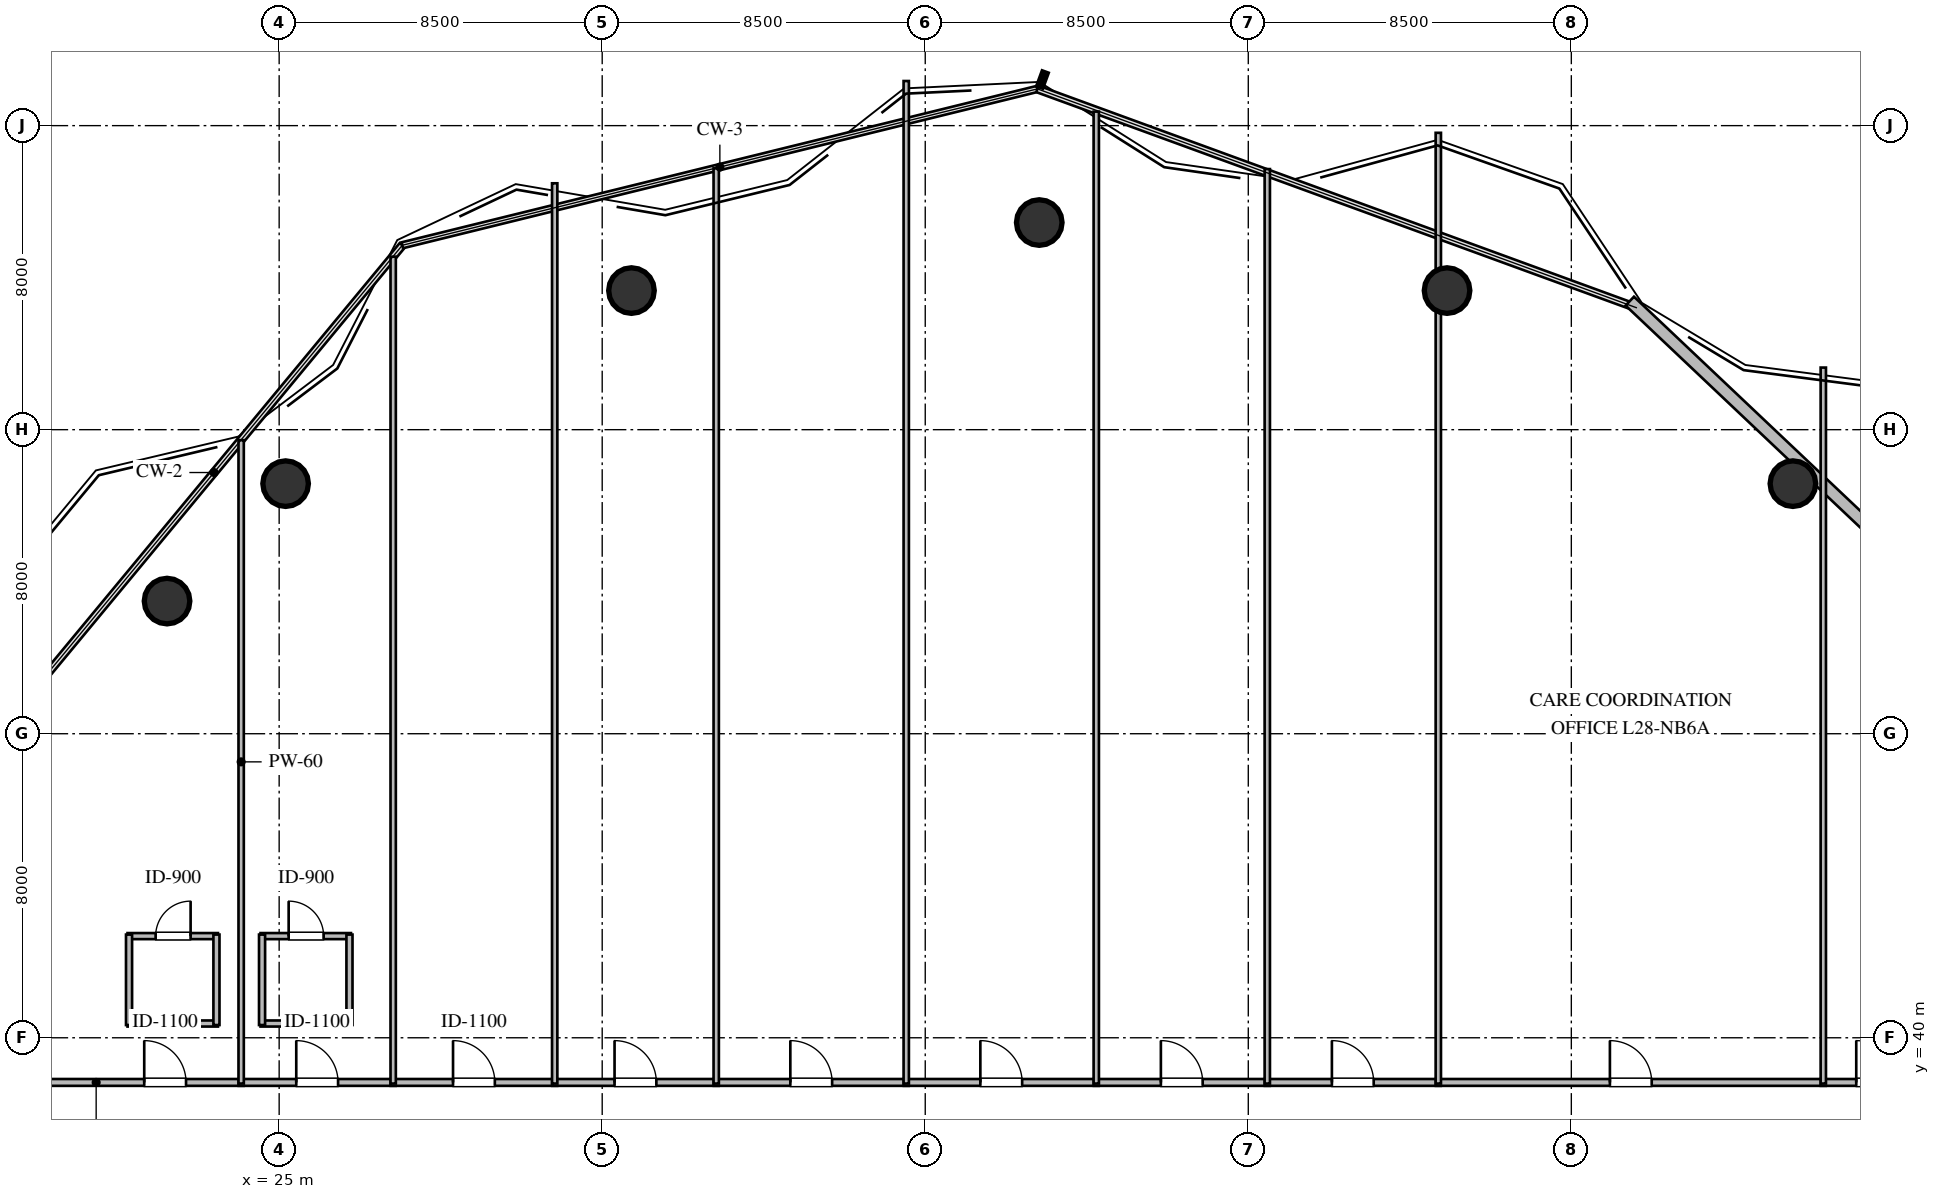
"""IFC4 building model, lengths in metres.
Left out: names, types, materials, properties, quantities, classifications, styles, units other than length and angle.
Written with IfcOpenShell. Run it as: python <this file> out.ifc"""

import sys

from ifc_helpers import new_model, si_unit, direction, frame, frame_2d, origin, origin_2d, place, context, subcontext, project, spatial, rectangle, circle, extrude, element, fill, save


model = new_model("IFC4")
c1 = context("Model", 3, precision=1e-05, world=origin(), true_north=direction((0.0, 1.0)))
c2 = subcontext(c1, "Body", "Model", "MODEL_VIEW")
j1 = project(units=[si_unit("LENGTHUNIT", "METRE"), si_unit("PLANEANGLEUNIT", "RADIAN")], contexts=[c1])
p1 = place(None, origin())
s1 = spatial("IfcSite", under=j1, at=p1, CompositionType="ELEMENT")
p2 = place(p1, origin())
s2 = spatial("IfcBuilding", under=s1, at=p2, CompositionType="ELEMENT")
p3 = place(p2, frame((0.0, 0.0, 109.8)))
s3 = spatial("IfcBuildingStorey", under=s2, at=p3, CompositionType="ELEMENT", Elevation=109.8)
for number, where, z_axis, x_axis in (
    (1, (64.83, 54.58, 0.0), (0.0, 0.0, 1.0), (1.0, 0.0, 0.0)),
    (2, (55.73, 59.66, 0.0), (0.0, 0.0, 1.0), (1.0, 0.0, 0.0)),
    (3, (45.0, 61.45, 0.0), (0.0, 0.0, 1.0), (1.0, 0.0, 0.0)),
    (4, (34.27, 59.66, 0.0), (0.0, 0.0, 1.0), (1.0, 0.0, 0.0)),
    (5, (25.17, 54.58, 0.0), (0.0, 0.0, 1.0), (1.0, 0.0, 0.0)),
    (6, (22.05, 51.49, 0.0), (0.0, 0.0, 1.0), (1.0, 0.0, 0.0)),
):
    element("IfcColumn", number, at=place(p3, frame(where, z_axis=z_axis, x_axis=x_axis)), inside=s3, PredefinedType="COLUMN", context=c2, shape_type="SweptSolid", body=[
        extrude(circle(Radius=0.6, at=origin_2d()), origin(), (0.0, 0.0, 1.0), 3.6),
    ])
p4 = place(p3, frame((60.538, 59.383, 0.0), z_axis=(0.0, 0.0, 1.0), x_axis=(0.726378346584, -0.687295058628, 0.0)))
e7 = element("IfcWall", 7, at=p4, inside=s3, PredefinedType="STANDARD", context=c2, shape_type="SweptSolid", body=[
    extrude(rectangle(XDim=15.654, YDim=0.32, at=frame_2d((7.827, 0.0))), origin(), (0.0, 0.0, 1.0), 3.36),
])
p5 = place(p3, frame((21.01, 40.375, 0.0), z_axis=(0.0, 0.0, 1.0), x_axis=(1.0, 0.0, 0.0)))
e8 = element("IfcWall", 8, at=p5, inside=s3, PredefinedType="PLUMBINGWALL", context=c2, shape_type="SweptSolid", body=[
    extrude(rectangle(XDim=2.38, YDim=0.16, at=frame_2d((1.19, 0.0))), origin(), (0.0, 0.0, 1.0), 3.36),
])
p6 = place(p3, frame((21.01, 42.675, 0.0), z_axis=(0.0, 0.0, 1.0), x_axis=(1.0, 0.0, 0.0)))
e9 = element("IfcWall", 9, at=p6, inside=s3, PredefinedType="PLUMBINGWALL", context=c2, shape_type="SweptSolid", body=[
    extrude(rectangle(XDim=2.38, YDim=0.16, at=frame_2d((1.19, 0.0))), origin(), (0.0, 0.0, 1.0), 3.36),
])
p7 = place(p6, frame((0.74, 0.0, 0.0)))
e10 = element("IfcOpeningElement", 10, at=p7, cuts=e9, PredefinedType="OPENING", context=c2, shape_type="SweptSolid", body=[
    extrude(rectangle(XDim=0.92, YDim=2.1, at=frame_2d((0.46, 1.05))), frame((0.0, 0.09, 0.0), z_axis=(0.0, -1.0, 0.0), x_axis=(1.0, 0.0, 0.0)), (0.0, 0.0, 1.0), 0.18),
])
p8 = place(p3, frame((21.05, 40.335, 0.0), z_axis=(0.0, 0.0, 1.0), x_axis=(0.0, 1.0, 0.0)))
e11 = element("IfcWall", 11, at=p8, inside=s3, PredefinedType="PLUMBINGWALL", context=c2, shape_type="SweptSolid", body=[
    extrude(rectangle(XDim=2.38, YDim=0.16, at=frame_2d((1.19, 0.0))), origin(), (0.0, 0.0, 1.0), 3.36),
])
p9 = place(p3, frame((23.35, 40.335, 0.0), z_axis=(0.0, 0.0, 1.0), x_axis=(0.0, 1.0, 0.0)))
e12 = element("IfcWall", 12, at=p9, inside=s3, PredefinedType="PLUMBINGWALL", context=c2, shape_type="SweptSolid", body=[
    extrude(rectangle(XDim=2.38, YDim=0.16, at=frame_2d((1.19, 0.0))), origin(), (0.0, 0.0, 1.0), 2.806),
])
p10 = place(p3, frame((24.51, 40.375, 0.0), z_axis=(0.0, 0.0, 1.0), x_axis=(1.0, 0.0, 0.0)))
e13 = element("IfcWall", 13, at=p10, inside=s3, PredefinedType="PLUMBINGWALL", context=c2, shape_type="SweptSolid", body=[
    extrude(rectangle(XDim=2.38, YDim=0.16, at=frame_2d((1.19, 0.0))), origin(), (0.0, 0.0, 1.0), 3.36),
])
p11 = place(p3, frame((24.51, 42.675, 0.0), z_axis=(0.0, 0.0, 1.0), x_axis=(1.0, 0.0, 0.0)))
e14 = element("IfcWall", 14, at=p11, inside=s3, PredefinedType="PLUMBINGWALL", context=c2, shape_type="SweptSolid", body=[
    extrude(rectangle(XDim=2.38, YDim=0.16, at=frame_2d((1.19, 0.0))), origin(), (0.0, 0.0, 1.0), 3.36),
])
p12 = place(p11, frame((0.74, 0.0, 0.0)))
e15 = element("IfcOpeningElement", 15, at=p12, cuts=e14, PredefinedType="OPENING", context=c2, shape_type="SweptSolid", body=[
    extrude(rectangle(XDim=0.92, YDim=2.1, at=frame_2d((0.46, 1.05))), frame((0.0, 0.09, 0.0), z_axis=(0.0, -1.0, 0.0), x_axis=(1.0, 0.0, 0.0)), (0.0, 0.0, 1.0), 0.18),
])
for number, where, z_axis, x_axis in (
    (16, (24.55, 40.335, 0.0), (0.0, 0.0, 1.0), (0.0, 1.0, 0.0)),
    (17, (26.85, 40.335, 0.0), (0.0, 0.0, 1.0), (0.0, 1.0, 0.0)),
):
    element("IfcWall", number, at=place(p3, frame(where, z_axis=z_axis, x_axis=x_axis)), inside=s3, PredefinedType="PLUMBINGWALL", context=c2, shape_type="SweptSolid", body=[
        extrude(rectangle(XDim=2.38, YDim=0.16, at=frame_2d((1.19, 0.0))), origin(), (0.0, 0.0, 1.0), 3.36),
    ])
p13 = place(p3, frame((16.305, 38.825, 0.0), z_axis=(0.0, 0.0, 1.0), x_axis=(1.0, 0.0, 0.0)))
e18 = element("IfcWall", 18, at=p13, inside=s3, PredefinedType="PARTITIONING", context=c2, shape_type="SweptSolid", body=[
    extrude(rectangle(XDim=7.76, YDim=0.18, at=frame_2d((3.88, 0.0))), origin(), (0.0, 0.0, 1.0), 3.36),
])
p14 = place(p13, frame((5.145, 0.0, 0.0)))
e19 = element("IfcOpeningElement", 19, at=p14, cuts=e18, PredefinedType="OPENING", context=c2, shape_type="SweptSolid", body=[
    extrude(rectangle(XDim=1.1, YDim=2.1, at=frame_2d((0.55, 1.05))), frame((0.0, 0.1, 0.0), z_axis=(0.0, -1.0, 0.0), x_axis=(1.0, 0.0, 0.0)), (0.0, 0.0, 1.0), 0.2),
])
p15 = place(p3, frame((23.935, 38.825, 0.0), z_axis=(0.0, 0.0, 1.0), x_axis=(1.0, 0.0, 0.0)))
e20 = element("IfcWall", 20, at=p15, inside=s3, PredefinedType="PARTITIONING", context=c2, shape_type="SweptSolid", body=[
    extrude(rectangle(XDim=4.13, YDim=0.18, at=frame_2d((2.065, 0.0))), origin(), (0.0, 0.0, 1.0), 3.36),
])
p16 = place(p15, frame((1.515, 0.0, 0.0)))
e21 = element("IfcOpeningElement", 21, at=p16, cuts=e20, PredefinedType="OPENING", context=c2, shape_type="SweptSolid", body=[
    extrude(rectangle(XDim=1.1, YDim=2.1, at=frame_2d((0.55, 1.05))), frame((0.0, 0.1, 0.0), z_axis=(0.0, -1.0, 0.0), x_axis=(1.0, 0.0, 0.0)), (0.0, 0.0, 1.0), 0.2),
])
p17 = place(p3, frame((27.935, 38.825, 0.0), z_axis=(0.0, 0.0, 1.0), x_axis=(1.0, 0.0, 0.0)))
e22 = element("IfcWall", 22, at=p17, inside=s3, PredefinedType="PARTITIONING", context=c2, shape_type="SweptSolid", body=[
    extrude(rectangle(XDim=4.38, YDim=0.18, at=frame_2d((2.19, 0.0))), origin(), (0.0, 0.0, 1.0), 3.36),
])
p18 = place(p17, frame((1.64, 0.0, 0.0)))
e23 = element("IfcOpeningElement", 23, at=p18, cuts=e22, PredefinedType="OPENING", context=c2, shape_type="SweptSolid", body=[
    extrude(rectangle(XDim=1.1, YDim=2.1, at=frame_2d((0.55, 1.05))), frame((0.0, 0.1, 0.0), z_axis=(0.0, -1.0, 0.0), x_axis=(1.0, 0.0, 0.0)), (0.0, 0.0, 1.0), 0.2),
])
p19 = place(p3, frame((32.185, 38.825, 0.0), z_axis=(0.0, 0.0, 1.0), x_axis=(1.0, 0.0, 0.0)))
e24 = element("IfcWall", 24, at=p19, inside=s3, PredefinedType="PARTITIONING", context=c2, shape_type="SweptSolid", body=[
    extrude(rectangle(XDim=4.38, YDim=0.18, at=frame_2d((2.19, 0.0))), origin(), (0.0, 0.0, 1.0), 3.36),
])
p20 = place(p19, frame((1.64, 0.0, 0.0)))
e25 = element("IfcOpeningElement", 25, at=p20, cuts=e24, PredefinedType="OPENING", context=c2, shape_type="SweptSolid", body=[
    extrude(rectangle(XDim=1.1, YDim=2.1, at=frame_2d((0.55, 1.05))), frame((0.0, 0.1, 0.0), z_axis=(0.0, -1.0, 0.0), x_axis=(1.0, 0.0, 0.0)), (0.0, 0.0, 1.0), 0.2),
])
p21 = place(p3, frame((36.435, 38.825, 0.0), z_axis=(0.0, 0.0, 1.0), x_axis=(1.0, 0.0, 0.0)))
e26 = element("IfcWall", 26, at=p21, inside=s3, PredefinedType="PARTITIONING", context=c2, shape_type="SweptSolid", body=[
    extrude(rectangle(XDim=5.13, YDim=0.18, at=frame_2d((2.565, 0.0))), origin(), (0.0, 0.0, 1.0), 3.36),
])
p22 = place(p21, frame((2.015, 0.0, 0.0)))
e27 = element("IfcOpeningElement", 27, at=p22, cuts=e26, PredefinedType="OPENING", context=c2, shape_type="SweptSolid", body=[
    extrude(rectangle(XDim=1.1, YDim=2.1, at=frame_2d((0.55, 1.05))), frame((0.0, 0.1, 0.0), z_axis=(0.0, -1.0, 0.0), x_axis=(1.0, 0.0, 0.0)), (0.0, 0.0, 1.0), 0.2),
])
p23 = place(p3, frame((41.435, 38.825, 0.0), z_axis=(0.0, 0.0, 1.0), x_axis=(1.0, 0.0, 0.0)))
e28 = element("IfcWall", 28, at=p23, inside=s3, PredefinedType="PARTITIONING", context=c2, shape_type="SweptSolid", body=[
    extrude(rectangle(XDim=5.13, YDim=0.18, at=frame_2d((2.565, 0.0))), origin(), (0.0, 0.0, 1.0), 3.36),
])
p24 = place(p23, frame((2.015, 0.0, 0.0)))
e29 = element("IfcOpeningElement", 29, at=p24, cuts=e28, PredefinedType="OPENING", context=c2, shape_type="SweptSolid", body=[
    extrude(rectangle(XDim=1.1, YDim=2.1, at=frame_2d((0.55, 1.05))), frame((0.0, 0.1, 0.0), z_axis=(0.0, -1.0, 0.0), x_axis=(1.0, 0.0, 0.0)), (0.0, 0.0, 1.0), 0.2),
])
p25 = place(p3, frame((46.435, 38.825, 0.0), z_axis=(0.0, 0.0, 1.0), x_axis=(1.0, 0.0, 0.0)))
e30 = element("IfcWall", 30, at=p25, inside=s3, PredefinedType="PARTITIONING", context=c2, shape_type="SweptSolid", body=[
    extrude(rectangle(XDim=4.63, YDim=0.18, at=frame_2d((2.315, 0.0))), origin(), (0.0, 0.0, 1.0), 3.36),
])
p26 = place(p25, frame((1.765, 0.0, 0.0)))
e31 = element("IfcOpeningElement", 31, at=p26, cuts=e30, PredefinedType="OPENING", context=c2, shape_type="SweptSolid", body=[
    extrude(rectangle(XDim=1.1, YDim=2.1, at=frame_2d((0.55, 1.05))), frame((0.0, 0.1, 0.0), z_axis=(0.0, -1.0, 0.0), x_axis=(1.0, 0.0, 0.0)), (0.0, 0.0, 1.0), 0.2),
])
p27 = place(p3, frame((50.935, 38.825, 0.0), z_axis=(0.0, 0.0, 1.0), x_axis=(1.0, 0.0, 0.0)))
e32 = element("IfcWall", 32, at=p27, inside=s3, PredefinedType="PARTITIONING", context=c2, shape_type="SweptSolid", body=[
    extrude(rectangle(XDim=4.63, YDim=0.18, at=frame_2d((2.315, 0.0))), origin(), (0.0, 0.0, 1.0), 3.36),
])
p28 = place(p27, frame((1.765, 0.0, 0.0)))
e33 = element("IfcOpeningElement", 33, at=p28, cuts=e32, PredefinedType="OPENING", context=c2, shape_type="SweptSolid", body=[
    extrude(rectangle(XDim=1.1, YDim=2.1, at=frame_2d((0.55, 1.05))), frame((0.0, 0.1, 0.0), z_axis=(0.0, -1.0, 0.0), x_axis=(1.0, 0.0, 0.0)), (0.0, 0.0, 1.0), 0.2),
])
p29 = place(p3, frame((55.435, 38.825, 0.0), z_axis=(0.0, 0.0, 1.0), x_axis=(1.0, 0.0, 0.0)))
e34 = element("IfcWall", 34, at=p29, inside=s3, PredefinedType="PARTITIONING", context=c2, shape_type="SweptSolid", body=[
    extrude(rectangle(XDim=10.26, YDim=0.18, at=frame_2d((5.13, 0.0))), origin(), (0.0, 0.0, 1.0), 3.36),
])
p30 = place(p29, frame((4.58, 0.0, 0.0)))
e35 = element("IfcOpeningElement", 35, at=p30, cuts=e34, PredefinedType="OPENING", context=c2, shape_type="SweptSolid", body=[
    extrude(rectangle(XDim=1.1, YDim=2.1, at=frame_2d((0.55, 1.05))), frame((0.0, 0.1, 0.0), z_axis=(0.0, -1.0, 0.0), x_axis=(1.0, 0.0, 0.0)), (0.0, 0.0, 1.0), 0.2),
])
p31 = place(p3, frame((65.565, 38.825, 0.0), z_axis=(0.0, 0.0, 1.0), x_axis=(1.0, 0.0, 0.0)))
e36 = element("IfcWall", 36, at=p31, inside=s3, PredefinedType="PARTITIONING", context=c2, shape_type="SweptSolid", body=[
    extrude(rectangle(XDim=2.965, YDim=0.18, at=frame_2d((1.482, 0.0))), origin(), (0.0, 0.0, 1.0), 3.36),
])
p32 = place(p31, frame((0.932, 0.0, 0.0)))
e37 = element("IfcOpeningElement", 37, at=p32, cuts=e36, PredefinedType="OPENING", context=c2, shape_type="SweptSolid", body=[
    extrude(rectangle(XDim=1.1, YDim=2.1, at=frame_2d((0.55, 1.05))), frame((0.0, 0.1, 0.0), z_axis=(0.0, -1.0, 0.0), x_axis=(1.0, 0.0, 0.0)), (0.0, 0.0, 1.0), 0.2),
])
p33 = place(p3, frame((24.0, 55.724, 0.0), z_axis=(0.0, 0.0, 1.0), x_axis=(0.0, -1.0, 0.0)))
e38 = element("IfcWall", 38, at=p33, inside=s3, PredefinedType="PARTITIONING", context=c2, shape_type="SweptSolid", body=[
    extrude(rectangle(XDim=16.929, YDim=0.14, at=frame_2d((8.465, 0.0))), origin(), (0.0, 0.0, 1.0), 2.806),
])
p34 = place(p3, frame((28.0, 60.552, 0.0), z_axis=(0.0, 0.0, 1.0), x_axis=(0.0, -1.0, 0.0)))
e39 = element("IfcWall", 39, at=p34, inside=s3, PredefinedType="PARTITIONING", context=c2, shape_type="SweptSolid", body=[
    extrude(rectangle(XDim=21.757, YDim=0.14, at=frame_2d((10.879, 0.0))), origin(), (0.0, 0.0, 1.0), 3.36),
])
p35 = place(p3, frame((32.25, 62.483, 0.0), z_axis=(0.0, 0.0, 1.0), x_axis=(0.0, -1.0, 0.0)))
e40 = element("IfcWall", 40, at=p35, inside=s3, PredefinedType="PARTITIONING", context=c2, shape_type="SweptSolid", body=[
    extrude(rectangle(XDim=23.688, YDim=0.14, at=frame_2d((11.844, 0.0))), origin(), (0.0, 0.0, 1.0), 3.36),
])
p36 = place(p3, frame((36.5, 62.876, 0.0), z_axis=(0.0, 0.0, 1.0), x_axis=(0.0, -1.0, 0.0)))
e41 = element("IfcWall", 41, at=p36, inside=s3, PredefinedType="PARTITIONING", context=c2, shape_type="SweptSolid", body=[
    extrude(rectangle(XDim=24.081, YDim=0.14, at=frame_2d((12.041, 0.0))), origin(), (0.0, 0.0, 1.0), 3.36),
])
p37 = place(p3, frame((41.5, 65.174, 0.0), z_axis=(0.0, 0.0, 1.0), x_axis=(0.0, -1.0, 0.0)))
e42 = element("IfcWall", 42, at=p37, inside=s3, PredefinedType="PARTITIONING", context=c2, shape_type="SweptSolid", body=[
    extrude(rectangle(XDim=26.379, YDim=0.14, at=frame_2d((13.189, 0.0))), origin(), (0.0, 0.0, 1.0), 3.36),
])
p38 = place(p3, frame((46.5, 64.369, 0.0), z_axis=(0.0, 0.0, 1.0), x_axis=(0.0, -1.0, 0.0)))
e43 = element("IfcWall", 43, at=p38, inside=s3, PredefinedType="PARTITIONING", context=c2, shape_type="SweptSolid", body=[
    extrude(rectangle(XDim=25.574, YDim=0.14, at=frame_2d((12.787, 0.0))), origin(), (0.0, 0.0, 1.0), 3.36),
])
p39 = place(p3, frame((51.0, 62.857, 0.0), z_axis=(0.0, 0.0, 1.0), x_axis=(0.0, -1.0, 0.0)))
e44 = element("IfcWall", 44, at=p39, inside=s3, PredefinedType="PARTITIONING", context=c2, shape_type="SweptSolid", body=[
    extrude(rectangle(XDim=24.062, YDim=0.14, at=frame_2d((12.031, 0.0))), origin(), (0.0, 0.0, 1.0), 3.36),
])
p40 = place(p3, frame((55.5, 63.811, 0.0), z_axis=(0.0, 0.0, 1.0), x_axis=(0.0, -1.0, 0.0)))
e45 = element("IfcWall", 45, at=p40, inside=s3, PredefinedType="PARTITIONING", context=c2, shape_type="SweptSolid", body=[
    extrude(rectangle(XDim=25.016, YDim=0.14, at=frame_2d((12.508, 0.0))), origin(), (0.0, 0.0, 1.0), 3.36),
])
p41 = place(p3, frame((65.63, 57.634, 0.0), z_axis=(0.0, 0.0, 1.0), x_axis=(0.0, -1.0, 0.0)))
e46 = element("IfcWall", 46, at=p41, inside=s3, PredefinedType="PARTITIONING", context=c2, shape_type="SweptSolid", body=[
    extrude(rectangle(XDim=18.839, YDim=0.14, at=frame_2d((9.419, 0.0))), origin(), (0.0, 0.0, 1.0), 3.36),
])
p42 = place(p7, origin())
e47 = element("IfcDoor", 47, at=p42, inside=s3, OperationType="SINGLE_SWING_RIGHT", PredefinedType="DOOR", context=c2, shape_type="SweptSolid", body=[
    extrude(rectangle(XDim=0.92, YDim=2.1, at=frame_2d((0.46, 1.05))), frame((0.0, 0.025, 0.0), z_axis=(0.0, -1.0, 0.0), x_axis=(1.0, 0.0, 0.0)), (0.0, 0.0, 1.0), 0.05),
])
fill(e10, e47)
p43 = place(p12, origin())
e48 = element("IfcDoor", 48, at=p43, inside=s3, OperationType="SINGLE_SWING_LEFT", PredefinedType="DOOR", context=c2, shape_type="SweptSolid", body=[
    extrude(rectangle(XDim=0.92, YDim=2.1, at=frame_2d((0.46, 1.05))), frame((0.0, 0.025, 0.0), z_axis=(0.0, -1.0, 0.0), x_axis=(1.0, 0.0, 0.0)), (0.0, 0.0, 1.0), 0.05),
])
fill(e15, e48)
p44 = place(p14, origin())
e49 = element("IfcDoor", 49, at=p44, inside=s3, OperationType="SINGLE_SWING_LEFT", PredefinedType="DOOR", context=c2, shape_type="SweptSolid", body=[
    extrude(rectangle(XDim=1.1, YDim=2.1, at=frame_2d((0.55, 1.05))), frame((0.0, 0.025, 0.0), z_axis=(0.0, -1.0, 0.0), x_axis=(1.0, 0.0, 0.0)), (0.0, 0.0, 1.0), 0.05),
])
fill(e19, e49)
p45 = place(p16, origin())
e50 = element("IfcDoor", 50, at=p45, inside=s3, OperationType="SINGLE_SWING_LEFT", PredefinedType="DOOR", context=c2, shape_type="SweptSolid", body=[
    extrude(rectangle(XDim=1.1, YDim=2.1, at=frame_2d((0.55, 1.05))), frame((0.0, 0.025, 0.0), z_axis=(0.0, -1.0, 0.0), x_axis=(1.0, 0.0, 0.0)), (0.0, 0.0, 1.0), 0.05),
])
fill(e21, e50)
p46 = place(p18, origin())
e51 = element("IfcDoor", 51, at=p46, inside=s3, OperationType="SINGLE_SWING_LEFT", PredefinedType="DOOR", context=c2, shape_type="SweptSolid", body=[
    extrude(rectangle(XDim=1.1, YDim=2.1, at=frame_2d((0.55, 1.05))), frame((0.0, 0.025, 0.0), z_axis=(0.0, -1.0, 0.0), x_axis=(1.0, 0.0, 0.0)), (0.0, 0.0, 1.0), 0.05),
])
fill(e23, e51)
p47 = place(p20, origin())
e52 = element("IfcDoor", 52, at=p47, inside=s3, OperationType="SINGLE_SWING_LEFT", PredefinedType="DOOR", context=c2, shape_type="SweptSolid", body=[
    extrude(rectangle(XDim=1.1, YDim=2.1, at=frame_2d((0.55, 1.05))), frame((0.0, 0.025, 0.0), z_axis=(0.0, -1.0, 0.0), x_axis=(1.0, 0.0, 0.0)), (0.0, 0.0, 1.0), 0.05),
])
fill(e25, e52)
p48 = place(p22, origin())
e53 = element("IfcDoor", 53, at=p48, inside=s3, OperationType="SINGLE_SWING_LEFT", PredefinedType="DOOR", context=c2, shape_type="SweptSolid", body=[
    extrude(rectangle(XDim=1.1, YDim=2.1, at=frame_2d((0.55, 1.05))), frame((0.0, 0.025, 0.0), z_axis=(0.0, -1.0, 0.0), x_axis=(1.0, 0.0, 0.0)), (0.0, 0.0, 1.0), 0.05),
])
fill(e27, e53)
p49 = place(p24, origin())
e54 = element("IfcDoor", 54, at=p49, inside=s3, OperationType="SINGLE_SWING_LEFT", PredefinedType="DOOR", context=c2, shape_type="SweptSolid", body=[
    extrude(rectangle(XDim=1.1, YDim=2.1, at=frame_2d((0.55, 1.05))), frame((0.0, 0.025, 0.0), z_axis=(0.0, -1.0, 0.0), x_axis=(1.0, 0.0, 0.0)), (0.0, 0.0, 1.0), 0.05),
])
fill(e29, e54)
p50 = place(p26, origin())
e55 = element("IfcDoor", 55, at=p50, inside=s3, OperationType="SINGLE_SWING_LEFT", PredefinedType="DOOR", context=c2, shape_type="SweptSolid", body=[
    extrude(rectangle(XDim=1.1, YDim=2.1, at=frame_2d((0.55, 1.05))), frame((0.0, 0.025, 0.0), z_axis=(0.0, -1.0, 0.0), x_axis=(1.0, 0.0, 0.0)), (0.0, 0.0, 1.0), 0.05),
])
fill(e31, e55)
p51 = place(p28, origin())
e56 = element("IfcDoor", 56, at=p51, inside=s3, OperationType="SINGLE_SWING_LEFT", PredefinedType="DOOR", context=c2, shape_type="SweptSolid", body=[
    extrude(rectangle(XDim=1.1, YDim=2.1, at=frame_2d((0.55, 1.05))), frame((0.0, 0.025, 0.0), z_axis=(0.0, -1.0, 0.0), x_axis=(1.0, 0.0, 0.0)), (0.0, 0.0, 1.0), 0.05),
])
fill(e33, e56)
p52 = place(p30, origin())
e57 = element("IfcDoor", 57, at=p52, inside=s3, OperationType="SINGLE_SWING_LEFT", PredefinedType="DOOR", context=c2, shape_type="SweptSolid", body=[
    extrude(rectangle(XDim=1.1, YDim=2.1, at=frame_2d((0.55, 1.05))), frame((0.0, 0.025, 0.0), z_axis=(0.0, -1.0, 0.0), x_axis=(1.0, 0.0, 0.0)), (0.0, 0.0, 1.0), 0.05),
])
fill(e35, e57)
p53 = place(p32, origin())
e58 = element("IfcDoor", 58, at=p53, inside=s3, OperationType="SINGLE_SWING_LEFT", PredefinedType="DOOR", context=c2, shape_type="SweptSolid", body=[
    extrude(rectangle(XDim=1.1, YDim=2.1, at=frame_2d((0.55, 1.05))), frame((0.0, 0.025, 0.0), z_axis=(0.0, -1.0, 0.0), x_axis=(1.0, 0.0, 0.0)), (0.0, 0.0, 1.0), 0.05),
])
fill(e37, e58)
save(model, sys.argv[1])
